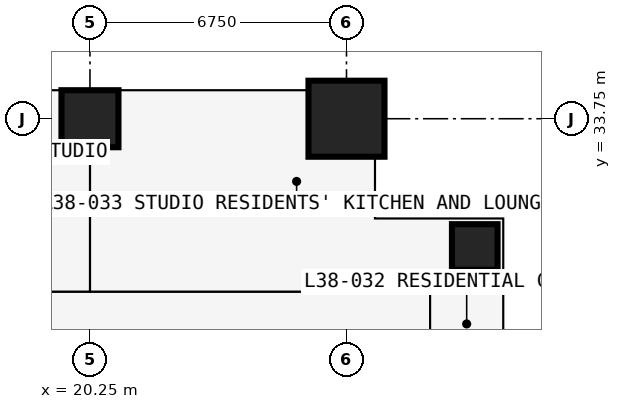
"""IFC4 building model, lengths in metres.
Left out: names, types, materials, properties, quantities, classifications, styles, units other than length and angle.
Written with IfcOpenShell. Run it as: python <this file> out.ifc"""

import sys

from ifc_helpers import new_model, si_unit, direction, frame, frame_2d, origin, origin_2d, place, context, subcontext, project, spatial, rectangle, extrude, element, fill, save


model = new_model("IFC4")
c1 = context("Model", 3, precision=1e-05, world=origin(), true_north=direction((0.0, 1.0)))
c2 = subcontext(c1, "Body", "Model", "MODEL_VIEW")
j1 = project(units=[si_unit("LENGTHUNIT", "METRE"), si_unit("PLANEANGLEUNIT", "RADIAN")], contexts=[c1])
p1 = place(None, origin())
s1 = spatial("IfcSite", under=j1, at=p1, CompositionType="ELEMENT")
p2 = place(p1, origin())
s2 = spatial("IfcBuilding", under=s1, at=p2, CompositionType="ELEMENT")
p3 = place(p2, frame((0.0, 0.0, 142.2)))
s3 = spatial("IfcBuildingStorey", under=s2, at=p3, CompositionType="ELEMENT", Elevation=142.2)
p4 = place(p3, frame((20.25, 33.75, 0.0), z_axis=(0.0, 0.0, 1.0), x_axis=(1.0, 0.0, 0.0)))
e1 = element("IfcColumn", 1, at=p4, inside=s3, PredefinedType="COLUMN", context=c2, shape_type="SweptSolid", body=[
    extrude(rectangle(XDim=1.5, YDim=1.5, at=origin_2d()), origin(), (0.0, 0.0, 1.0), 3.6),
])
p5 = place(p3, frame((27.0, 33.75, 0.0), z_axis=(0.0, 0.0, 1.0), x_axis=(1.0, 0.0, 0.0)))
e2 = element("IfcColumn", 2, at=p5, inside=s3, PredefinedType="COLUMN", context=c2, shape_type="SweptSolid", body=[
    extrude(rectangle(XDim=2.0, YDim=2.0, at=origin_2d()), origin(), (0.0, 0.0, 1.0), 3.6),
])
p6 = place(p3, frame((30.375, 30.375, 0.0), z_axis=(0.0, 0.0, 1.0), x_axis=(1.0, 0.0, 0.0)))
e3 = element("IfcColumn", 3, at=p6, inside=s3, PredefinedType="COLUMN", context=c2, shape_type="SweptSolid", body=[
    extrude(rectangle(XDim=1.2, YDim=1.2, at=origin_2d()), origin(), (0.0, 0.0, 1.0), 3.6),
])
p7 = place(p3, frame((31.125, 27.75, 0.0), z_axis=(0.0, 0.0, 1.0), x_axis=(0.0, 1.0, 0.0)))
e4 = element("IfcWall", 4, at=p7, inside=s3, PredefinedType="SOLIDWALL", context=c2, shape_type="SweptSolid", body=[
    extrude(rectangle(XDim=3.375, YDim=0.3, at=frame_2d((1.688, 0.0))), origin(), (0.0, 0.0, 1.0), 3.375),
])
p8 = place(p7, frame((1.663, 0.0, 0.9)))
e5 = element("IfcOpeningElement", 5, at=p8, cuts=e4, PredefinedType="OPENING", context=c2, shape_type="SweptSolid", body=[
    extrude(rectangle(XDim=1.5, YDim=1.8, at=frame_2d((0.75, 0.9))), frame((0.0, 0.16, 0.0), z_axis=(0.0, -1.0, 0.0), x_axis=(1.0, 0.0, 0.0)), (0.0, 0.0, 1.0), 0.32),
])
p9 = place(p3, frame((31.125, 31.125, 0.0), z_axis=(0.0, 0.0, 1.0), x_axis=(-1.0, 0.0, 0.0)))
e6 = element("IfcWall", 6, at=p9, inside=s3, PredefinedType="SOLIDWALL", context=c2, shape_type="SweptSolid", body=[
    extrude(rectangle(XDim=3.375, YDim=0.3, at=frame_2d((1.688, 0.0))), origin(), (0.0, 0.0, 1.0), 3.375),
])
p10 = place(p9, frame((0.788, 0.0, 0.6)))
e7 = element("IfcOpeningElement", 7, at=p10, cuts=e6, PredefinedType="OPENING", context=c2, shape_type="SweptSolid", body=[
    extrude(rectangle(XDim=1.8, YDim=2.1, at=frame_2d((0.9, 1.05))), frame((0.0, 0.16, 0.0), z_axis=(0.0, -1.0, 0.0), x_axis=(1.0, 0.0, 0.0)), (0.0, 0.0, 1.0), 0.32),
])
p11 = place(p3, frame((27.75, 31.125, 0.0), z_axis=(0.0, 0.0, 1.0), x_axis=(0.0, 1.0, 0.0)))
e8 = element("IfcWall", 8, at=p11, inside=s3, PredefinedType="SOLIDWALL", context=c2, shape_type="SweptSolid", body=[
    extrude(rectangle(XDim=3.375, YDim=0.3, at=frame_2d((1.688, 0.0))), origin(), (0.0, 0.0, 1.0), 3.375),
])
p12 = place(p11, frame((0.292, 0.0, 0.9)))
e9 = element("IfcOpeningElement", 9, at=p12, cuts=e8, PredefinedType="OPENING", context=c2, shape_type="SweptSolid", body=[
    extrude(rectangle(XDim=1.2, YDim=1.8, at=frame_2d((0.6, 0.9))), frame((0.0, 0.16, 0.0), z_axis=(0.0, -1.0, 0.0), x_axis=(1.0, 0.0, 0.0)), (0.0, 0.0, 1.0), 0.32),
])
p13 = place(p3, frame((13.5, 34.5, 0.0), z_axis=(0.0, 0.0, 1.0), x_axis=(1.0, 0.0, 0.0)))
e10 = element("IfcWall", 10, at=p13, inside=s3, PredefinedType="SOLIDWALL", context=c2, shape_type="SweptSolid", body=[
    extrude(rectangle(XDim=6.75, YDim=0.15, at=frame_2d((3.375, 0.0))), origin(), (0.0, 0.0, 1.0), 3.375),
])
p14 = place(p13, frame((1.129, 0.0, 0.0)))
e11 = element("IfcOpeningElement", 11, at=p14, cuts=e10, PredefinedType="OPENING", context=c2, shape_type="SweptSolid", body=[
    extrude(rectangle(XDim=1.0, YDim=2.2, at=frame_2d((0.5, 1.1))), frame((0.0, 0.085, 0.0), z_axis=(0.0, -1.0, 0.0), x_axis=(1.0, 0.0, 0.0)), (0.0, 0.0, 1.0), 0.17),
])
p15 = place(p13, frame((2.258, 0.0, 0.9)))
e12 = element("IfcOpeningElement", 12, at=p15, cuts=e10, PredefinedType="OPENING", context=c2, shape_type="SweptSolid", body=[
    extrude(rectangle(XDim=0.9, YDim=1.8, at=frame_2d((0.45, 0.9))), frame((0.0, 0.085, 0.0), z_axis=(0.0, -1.0, 0.0), x_axis=(1.0, 0.0, 0.0)), (0.0, 0.0, 1.0), 0.17),
])
p16 = place(p13, frame((4.887, 0.0, 0.0)))
e13 = element("IfcOpeningElement", 13, at=p16, cuts=e10, PredefinedType="OPENING", context=c2, shape_type="SweptSolid", body=[
    extrude(rectangle(XDim=1.0, YDim=2.2, at=frame_2d((0.5, 1.1))), frame((0.0, 0.085, 0.0), z_axis=(0.0, -1.0, 0.0), x_axis=(1.0, 0.0, 0.0)), (0.0, 0.0, 1.0), 0.17),
])
p17 = place(p13, frame((3.575, 0.0, 0.9)))
e14 = element("IfcOpeningElement", 14, at=p17, cuts=e10, PredefinedType="OPENING", context=c2, shape_type="SweptSolid", body=[
    extrude(rectangle(XDim=1.2, YDim=1.8, at=frame_2d((0.6, 0.9))), frame((0.0, 0.085, 0.0), z_axis=(0.0, -1.0, 0.0), x_axis=(1.0, 0.0, 0.0)), (0.0, 0.0, 1.0), 0.17),
])
p18 = place(p3, frame((11.3, 29.2, 0.0), z_axis=(0.0, 0.0, 1.0), x_axis=(1.0, 0.0, 0.0)))
e15 = element("IfcWall", 15, at=p18, inside=s3, PredefinedType="PARTITIONING", context=c2, shape_type="SweptSolid", body=[
    extrude(rectangle(XDim=19.809, YDim=0.15, at=frame_2d((9.904, 0.0))), origin(), (0.0, 0.0, 1.0), 3.375),
])
p19 = place(p18, frame((12.9, 0.0, 0.0)))
e16 = element("IfcOpeningElement", 16, at=p19, cuts=e15, PredefinedType="OPENING", context=c2, shape_type="SweptSolid", body=[
    extrude(rectangle(XDim=1.0, YDim=2.2, at=frame_2d((0.5, 1.1))), frame((0.0, 0.085, 0.0), z_axis=(0.0, -1.0, 0.0), x_axis=(1.0, 0.0, 0.0)), (0.0, 0.0, 1.0), 0.17),
])
p20 = place(p18, frame((6.4, 0.0, 0.0)))
e17 = element("IfcOpeningElement", 17, at=p20, cuts=e15, PredefinedType="OPENING", context=c2, shape_type="SweptSolid", body=[
    extrude(rectangle(XDim=0.95, YDim=2.2, at=frame_2d((0.475, 1.1))), frame((0.0, 0.085, 0.0), z_axis=(0.0, -1.0, 0.0), x_axis=(1.0, 0.0, 0.0)), (0.0, 0.0, 1.0), 0.17),
])
p21 = place(p18, frame((0.6, 0.0, 0.0)))
e18 = element("IfcOpeningElement", 18, at=p21, cuts=e15, PredefinedType="OPENING", context=c2, shape_type="SweptSolid", body=[
    extrude(rectangle(XDim=1.0, YDim=2.2, at=frame_2d((0.5, 1.1))), frame((0.0, 0.085, 0.0), z_axis=(0.0, -1.0, 0.0), x_axis=(1.0, 0.0, 0.0)), (0.0, 0.0, 1.0), 0.17),
])
p22 = place(p3, frame((20.25, 29.2, 0.0), z_axis=(0.0, 0.0, 1.0), x_axis=(0.0, 1.0, 0.0)))
e19 = element("IfcWall", 19, at=p22, inside=s3, PredefinedType="PARTITIONING", context=c2, shape_type="SweptSolid", body=[
    extrude(rectangle(XDim=5.284, YDim=0.15, at=frame_2d((2.642, 0.0))), origin(), (0.0, 0.0, 1.0), 2.806),
])
p23 = place(p3, frame((29.2, 11.3, 0.0), z_axis=(0.0, 0.0, 1.0), x_axis=(0.0, 1.0, 0.0)))
e20 = element("IfcWall", 20, at=p23, inside=s3, PredefinedType="PARTITIONING", context=c2, shape_type="SweptSolid", body=[
    extrude(rectangle(XDim=17.9, YDim=0.2, at=frame_2d((8.95, 0.0))), origin(), (0.0, 0.0, 1.0), 3.375),
])
p24 = place(p23, frame((10.55, 0.0, 0.0)))
e21 = element("IfcOpeningElement", 21, at=p24, cuts=e20, PredefinedType="OPENING", context=c2, shape_type="SweptSolid", body=[
    extrude(rectangle(XDim=0.95, YDim=2.2, at=frame_2d((0.475, 1.1))), frame((0.0, 0.11, 0.0), z_axis=(0.0, -1.0, 0.0), x_axis=(1.0, 0.0, 0.0)), (0.0, 0.0, 1.0), 0.22),
])
p25 = place(p23, frame((16.3, 0.0, 0.0)))
e22 = element("IfcOpeningElement", 22, at=p25, cuts=e20, PredefinedType="OPENING", context=c2, shape_type="SweptSolid", body=[
    extrude(rectangle(XDim=1.0, YDim=2.2, at=frame_2d((0.5, 1.1))), frame((0.0, 0.11, 0.0), z_axis=(0.0, -1.0, 0.0), x_axis=(1.0, 0.0, 0.0)), (0.0, 0.0, 1.0), 0.22),
])
p26 = place(p23, frame((5.1, 0.0, 0.0)))
e23 = element("IfcOpeningElement", 23, at=p26, cuts=e20, PredefinedType="OPENING", context=c2, shape_type="SweptSolid", body=[
    extrude(rectangle(XDim=0.95, YDim=2.2, at=frame_2d((0.475, 1.1))), frame((0.0, 0.11, 0.0), z_axis=(0.0, -1.0, 0.0), x_axis=(1.0, 0.0, 0.0)), (0.0, 0.0, 1.0), 0.22),
])
p27 = place(p8, origin())
e24 = element("IfcWindow", 24, at=p27, inside=s3, PartitioningType="SINGLE_PANEL", PredefinedType="WINDOW", context=c2, shape_type="SweptSolid", body=[
    extrude(rectangle(XDim=1.5, YDim=1.8, at=frame_2d((0.75, 0.9))), frame((0.0, 0.03, 0.0), z_axis=(0.0, -1.0, 0.0), x_axis=(1.0, 0.0, 0.0)), (0.0, 0.0, 1.0), 0.06),
])
fill(e5, e24)
p28 = place(p10, origin())
e25 = element("IfcWindow", 25, at=p28, inside=s3, PartitioningType="SINGLE_PANEL", PredefinedType="WINDOW", context=c2, shape_type="SweptSolid", body=[
    extrude(rectangle(XDim=1.8, YDim=2.1, at=frame_2d((0.9, 1.05))), frame((0.0, 0.03, 0.0), z_axis=(0.0, -1.0, 0.0), x_axis=(1.0, 0.0, 0.0)), (0.0, 0.0, 1.0), 0.06),
])
fill(e7, e25)
p29 = place(p12, origin())
e26 = element("IfcWindow", 26, at=p29, inside=s3, PartitioningType="SINGLE_PANEL", PredefinedType="WINDOW", context=c2, shape_type="SweptSolid", body=[
    extrude(rectangle(XDim=1.2, YDim=1.8, at=frame_2d((0.6, 0.9))), frame((0.0, 0.03, 0.0), z_axis=(0.0, -1.0, 0.0), x_axis=(1.0, 0.0, 0.0)), (0.0, 0.0, 1.0), 0.06),
])
fill(e9, e26)
p30 = place(p16, origin())
e27 = element("IfcDoor", 27, at=p30, inside=s3, OperationType="SINGLE_SWING_RIGHT", PredefinedType="DOOR", context=c2, shape_type="SweptSolid", body=[
    extrude(rectangle(XDim=1.0, YDim=2.2, at=frame_2d((0.5, 1.1))), frame((0.0, 0.025, 0.0), z_axis=(0.0, -1.0, 0.0), x_axis=(1.0, 0.0, 0.0)), (0.0, 0.0, 1.0), 0.05),
])
fill(e13, e27)
p31 = place(p25, origin())
e28 = element("IfcDoor", 28, at=p31, inside=s3, OperationType="SINGLE_SWING_LEFT", PredefinedType="DOOR", context=c2, shape_type="SweptSolid", body=[
    extrude(rectangle(XDim=1.0, YDim=2.2, at=frame_2d((0.5, 1.1))), frame((0.0, 0.025, 0.0), z_axis=(0.0, -1.0, 0.0), x_axis=(1.0, 0.0, 0.0)), (0.0, 0.0, 1.0), 0.05),
])
fill(e22, e28)
p32 = place(p19, origin())
e29 = element("IfcDoor", 29, at=p32, inside=s3, OperationType="SINGLE_SWING_LEFT", PredefinedType="DOOR", context=c2, shape_type="SweptSolid", body=[
    extrude(rectangle(XDim=1.0, YDim=2.2, at=frame_2d((0.5, 1.1))), frame((0.0, 0.025, 0.0), z_axis=(0.0, -1.0, 0.0), x_axis=(1.0, 0.0, 0.0)), (0.0, 0.0, 1.0), 0.05),
])
fill(e16, e29)
save(model, sys.argv[1])
